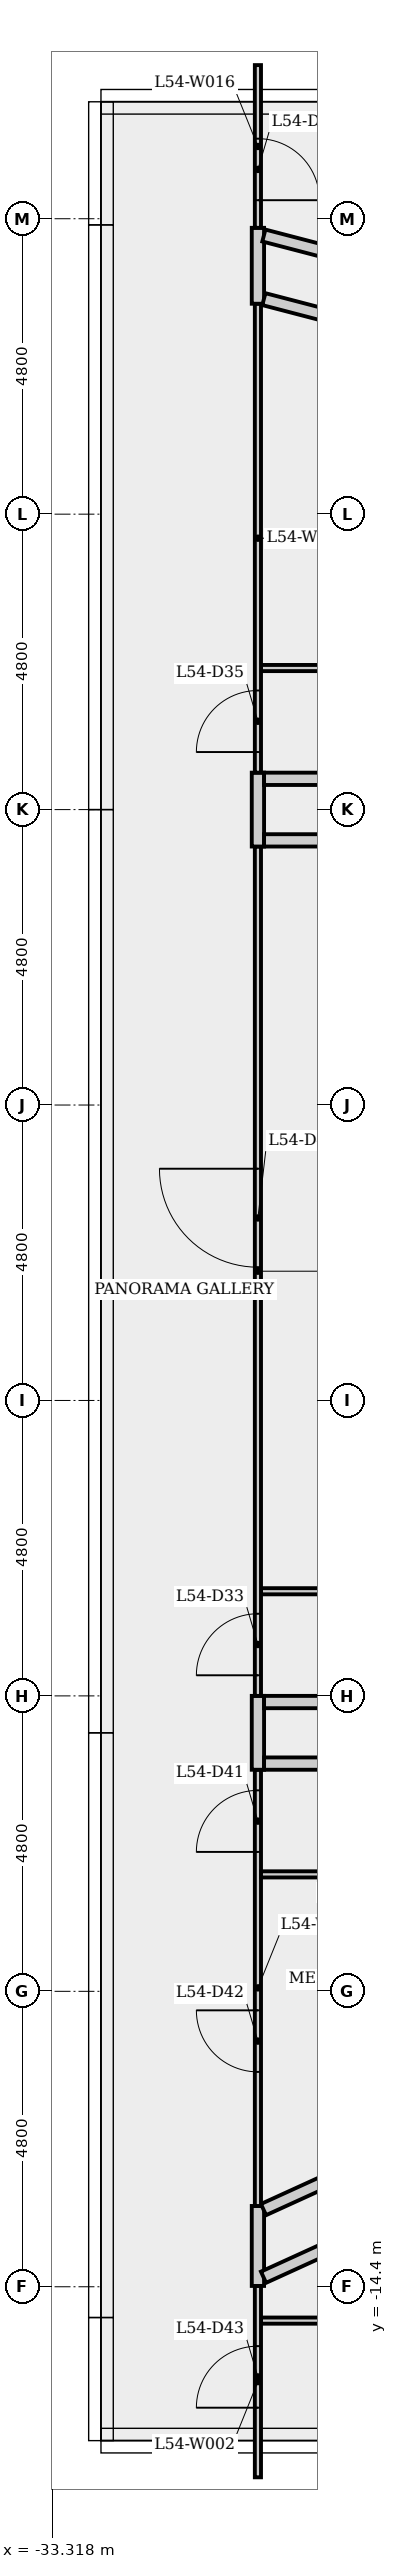
"""IFC4 building model, lengths in metres.
Left out: names, types, materials, properties, quantities, classifications, styles, units other than length and angle.
Written with IfcOpenShell. Run it as: python <this file> out.ifc"""

import sys

from ifc_helpers import new_model, si_unit, direction, frame, frame_2d, origin, place, context, subcontext, project, spatial, rectangle, extrude, element, fill, save


model = new_model("IFC4")
c1 = context("Model", 3, precision=1e-05, world=origin(), true_north=direction((0.0, 1.0)))
c2 = subcontext(c1, "Body", "Model", "MODEL_VIEW")
j1 = project(units=[si_unit("LENGTHUNIT", "METRE"), si_unit("PLANEANGLEUNIT", "RADIAN")], contexts=[c1])
p1 = place(None, origin())
s1 = spatial("IfcSite", under=j1, at=p1, CompositionType="ELEMENT")
p2 = place(p1, origin())
s2 = spatial("IfcBuilding", under=s1, at=p2, CompositionType="ELEMENT")
p3 = place(p2, frame((0.0, 0.0, 202.1)))
s3 = spatial("IfcBuildingStorey", under=s2, at=p3, CompositionType="ELEMENT", Elevation=202.1)
p4 = place(p3, frame((-29.924, -14.95, 0.0), z_axis=(0.0, 0.0, 1.0), x_axis=(1.0, 0.0, 0.0)))
e1 = element("IfcWall", 1, at=p4, inside=s3, PredefinedType="PARTITIONING", context=c2, shape_type="SweptSolid", body=[
    extrude(rectangle(XDim=13.496, YDim=0.1, at=frame_2d((6.748, 0.0))), origin(), (0.0, 0.0, 1.0), 3.6),
])
p5 = place(p4, frame((5.575, 0.0, 0.0)))
e2 = element("IfcOpeningElement", 2, at=p5, cuts=e1, PredefinedType="OPENING", context=c2, shape_type="SweptSolid", body=[
    extrude(rectangle(XDim=1.6, YDim=2.1, at=frame_2d((0.8, 1.05))), frame((0.0, 0.06, 0.0), z_axis=(0.0, -1.0, 0.0), x_axis=(1.0, 0.0, 0.0)), (0.0, 0.0, 1.0), 0.12),
])
p6 = place(p3, frame((-29.974, -17.496, 0.0), z_axis=(0.0, 0.0, 1.0), x_axis=(0.0, 1.0, 0.0)))
e3 = element("IfcWall", 3, at=p6, inside=s3, PredefinedType="PARTITIONING", context=c2, shape_type="SweptSolid", body=[
    extrude(rectangle(XDim=3.11, YDim=0.1, at=frame_2d((1.555, 0.0))), origin(), (0.0, 0.0, 1.0), 3.6),
])
p7 = place(p6, frame((1.131, 0.0, 0.0)))
e4 = element("IfcOpeningElement", 4, at=p7, cuts=e3, PredefinedType="OPENING", context=c2, shape_type="SweptSolid", body=[
    extrude(rectangle(XDim=1.0, YDim=2.1, at=frame_2d((0.5, 1.05))), frame((0.0, 0.06, 0.0), z_axis=(0.0, -1.0, 0.0), x_axis=(1.0, 0.0, 0.0)), (0.0, 0.0, 1.0), 0.12),
])
p8 = place(p3, frame((-29.974, -14.387, 0.0), z_axis=(0.0, 0.0, 1.0), x_axis=(0.0, 1.0, 0.0)))
e5 = element("IfcWall", 5, at=p8, inside=s3, PredefinedType="PLUMBINGWALL", context=c2, shape_type="SweptSolid", body=[
    extrude(rectangle(XDim=1.299, YDim=0.2, at=frame_2d((0.649, 0.0))), origin(), (0.0, 0.0, 1.0), 3.6),
])
p9 = place(p3, frame((-29.883, -13.146, 0.0), z_axis=(0.0, 0.0, 1.0), x_axis=(0.909854392912, 0.414927684903, 0.0)))
e6 = element("IfcWall", 6, at=p9, inside=s3, PredefinedType="PLUMBINGWALL", context=c2, shape_type="SweptSolid", body=[
    extrude(rectangle(XDim=16.791, YDim=0.2, at=frame_2d((8.396, 0.0))), origin(), (0.0, 0.0, 1.0), 3.6),
])
p10 = place(p3, frame((-29.974, -13.088, 0.0), z_axis=(0.0, 0.0, 1.0), x_axis=(0.0, 1.0, 0.0)))
e7 = element("IfcWall", 7, at=p10, inside=s3, PredefinedType="PARTITIONING", context=c2, shape_type="SweptSolid", body=[
    extrude(rectangle(XDim=7.088, YDim=0.1, at=frame_2d((3.544, 0.0))), origin(), (0.0, 0.0, 1.0), 3.6),
])
p11 = place(p10, frame((5.753, 0.0, 0.0)))
e8 = element("IfcOpeningElement", 8, at=p11, cuts=e7, PredefinedType="OPENING", context=c2, shape_type="SweptSolid", body=[
    extrude(rectangle(XDim=1.0, YDim=2.1, at=frame_2d((0.5, 1.05))), frame((0.0, 0.06, 0.0), z_axis=(0.0, -1.0, 0.0), x_axis=(1.0, 0.0, 0.0)), (0.0, 0.0, 1.0), 0.12),
])
p12 = place(p10, frame((2.179, 0.0, 0.0)))
e9 = element("IfcOpeningElement", 9, at=p12, cuts=e7, PredefinedType="OPENING", context=c2, shape_type="SweptSolid", body=[
    extrude(rectangle(XDim=1.0, YDim=2.1, at=frame_2d((0.5, 1.05))), frame((0.0, 0.06, 0.0), z_axis=(0.0, -1.0, 0.0), x_axis=(1.0, 0.0, 0.0)), (0.0, 0.0, 1.0), 0.12),
])
p13 = place(p3, frame((-29.974, -6.0, 0.0), z_axis=(0.0, 0.0, 1.0), x_axis=(0.0, 1.0, 0.0)))
e10 = element("IfcWall", 10, at=p13, inside=s3, PredefinedType="PLUMBINGWALL", context=c2, shape_type="SweptSolid", body=[
    extrude(rectangle(XDim=1.2, YDim=0.2, at=frame_2d((0.6, 0.0))), origin(), (0.0, 0.0, 1.0), 3.6),
])
p14 = place(p3, frame((-29.874, -4.9, 0.0), z_axis=(0.0, 0.0, 1.0), x_axis=(1.0, 0.0, 0.0)))
e11 = element("IfcWall", 11, at=p14, inside=s3, PredefinedType="PLUMBINGWALL", context=c2, shape_type="SweptSolid", body=[
    extrude(rectangle(XDim=18.173, YDim=0.2, at=frame_2d((9.086, 0.0))), origin(), (0.0, 0.0, 1.0), 3.6),
])
p15 = place(p3, frame((-29.924, -3.1, 0.0), z_axis=(0.0, 0.0, 1.0), x_axis=(1.0, 0.0, 0.0)))
e12 = element("IfcWall", 12, at=p15, inside=s3, PredefinedType="PARTITIONING", context=c2, shape_type="SweptSolid", body=[
    extrude(rectangle(XDim=18.173, YDim=0.1, at=frame_2d((9.086, 0.0))), origin(), (0.0, 0.0, 1.0), 3.6),
])
p16 = place(p15, frame((8.572, 0.0, 0.0)))
e13 = element("IfcOpeningElement", 13, at=p16, cuts=e12, PredefinedType="OPENING", context=c2, shape_type="SweptSolid", body=[
    extrude(rectangle(XDim=1.6, YDim=2.1, at=frame_2d((0.8, 1.05))), frame((0.0, 0.06, 0.0), z_axis=(0.0, -1.0, 0.0), x_axis=(1.0, 0.0, 0.0)), (0.0, 0.0, 1.0), 0.12),
])
p17 = place(p3, frame((-29.974, -4.8, 0.0), z_axis=(0.0, 0.0, 1.0), x_axis=(0.0, 1.0, 0.0)))
e14 = element("IfcWall", 14, at=p17, inside=s3, PredefinedType="PARTITIONING", context=c2, shape_type="SweptSolid", body=[
    extrude(rectangle(XDim=13.8, YDim=0.1, at=frame_2d((6.9, 0.0))), origin(), (0.0, 0.0, 1.0), 3.6),
])
p18 = place(p17, frame((0.335, 0.0, 0.0)))
e15 = element("IfcOpeningElement", 15, at=p18, cuts=e14, PredefinedType="OPENING", context=c2, shape_type="SweptSolid", body=[
    extrude(rectangle(XDim=1.0, YDim=2.1, at=frame_2d((0.5, 1.05))), frame((0.0, 0.06, 0.0), z_axis=(0.0, -1.0, 0.0), x_axis=(1.0, 0.0, 0.0)), (0.0, 0.0, 1.0), 0.12),
])
p19 = place(p17, frame((6.965, 0.0, 0.0)))
e16 = element("IfcOpeningElement", 16, at=p19, cuts=e14, PredefinedType="OPENING", context=c2, shape_type="SweptSolid", body=[
    extrude(rectangle(XDim=1.6, YDim=2.1, at=frame_2d((0.8, 1.05))), frame((0.0, 0.06, 0.0), z_axis=(0.0, -1.0, 0.0), x_axis=(1.0, 0.0, 0.0)), (0.0, 0.0, 1.0), 0.12),
])
p20 = place(p3, frame((-29.974, 9.0, 0.0), z_axis=(0.0, 0.0, 1.0), x_axis=(0.0, 1.0, 0.0)))
e17 = element("IfcWall", 17, at=p20, inside=s3, PredefinedType="PLUMBINGWALL", context=c2, shape_type="SweptSolid", body=[
    extrude(rectangle(XDim=1.2, YDim=0.2, at=frame_2d((0.6, 0.0))), origin(), (0.0, 0.0, 1.0), 3.6),
])
p21 = place(p3, frame((-29.874, 10.1, 0.0), z_axis=(0.0, 0.0, 1.0), x_axis=(1.0, 0.0, 0.0)))
e18 = element("IfcWall", 18, at=p21, inside=s3, PredefinedType="PLUMBINGWALL", context=c2, shape_type="SweptSolid", body=[
    extrude(rectangle(XDim=12.7, YDim=0.2, at=frame_2d((6.35, 0.0))), origin(), (0.0, 0.0, 1.0), 3.6),
])
p22 = place(p3, frame((-29.924, 11.9, 0.0), z_axis=(0.0, 0.0, 1.0), x_axis=(1.0, 0.0, 0.0)))
e19 = element("IfcWall", 19, at=p22, inside=s3, PredefinedType="PARTITIONING", context=c2, shape_type="SweptSolid", body=[
    extrude(rectangle(XDim=7.75, YDim=0.1, at=frame_2d((3.875, 0.0))), origin(), (0.0, 0.0, 1.0), 3.6),
])
p23 = place(p22, frame((3.075, 0.0, 0.0)))
e20 = element("IfcOpeningElement", 20, at=p23, cuts=e19, PredefinedType="OPENING", context=c2, shape_type="SweptSolid", body=[
    extrude(rectangle(XDim=1.6, YDim=2.1, at=frame_2d((0.8, 1.05))), frame((0.0, 0.06, 0.0), z_axis=(0.0, -1.0, 0.0), x_axis=(1.0, 0.0, 0.0)), (0.0, 0.0, 1.0), 0.12),
])
p24 = place(p3, frame((-29.974, 10.2, 0.0), z_axis=(0.0, 0.0, 1.0), x_axis=(0.0, 1.0, 0.0)))
e21 = element("IfcWall", 21, at=p24, inside=s3, PredefinedType="PARTITIONING", context=c2, shape_type="SweptSolid", body=[
    extrude(rectangle(XDim=7.619, YDim=0.1, at=frame_2d((3.81, 0.0))), origin(), (0.0, 0.0, 1.0), 3.6),
])
p25 = place(p24, frame((0.335, 0.0, 0.0)))
e22 = element("IfcOpeningElement", 22, at=p25, cuts=e21, PredefinedType="OPENING", context=c2, shape_type="SweptSolid", body=[
    extrude(rectangle(XDim=1.0, YDim=2.1, at=frame_2d((0.5, 1.05))), frame((0.0, 0.06, 0.0), z_axis=(0.0, -1.0, 0.0), x_axis=(1.0, 0.0, 0.0)), (0.0, 0.0, 1.0), 0.12),
])
p26 = place(p3, frame((-29.974, 17.819, 0.0), z_axis=(0.0, 0.0, 1.0), x_axis=(0.0, 1.0, 0.0)))
e23 = element("IfcWall", 23, at=p26, inside=s3, PredefinedType="PLUMBINGWALL", context=c2, shape_type="SweptSolid", body=[
    extrude(rectangle(XDim=1.233, YDim=0.2, at=frame_2d((0.617, 0.0))), origin(), (0.0, 0.0, 1.0), 3.6),
])
p27 = place(p3, frame((-29.877, 18.927, 0.0), z_axis=(0.0, 0.0, 1.0), x_axis=(0.967683445077, -0.252168098941, 0.0)))
e24 = element("IfcWall", 24, at=p27, inside=s3, PredefinedType="PLUMBINGWALL", context=c2, shape_type="SweptSolid", body=[
    extrude(rectangle(XDim=13.902, YDim=0.2, at=frame_2d((6.951, 0.0))), origin(), (0.0, 0.0, 1.0), 3.6),
])
p28 = place(p3, frame((-29.974, 21.696, 0.0), z_axis=(0.0, 0.0, 1.0), x_axis=(0.0, -1.0, 0.0)))
e25 = element("IfcWall", 25, at=p28, inside=s3, PredefinedType="PARTITIONING", context=c2, shape_type="SweptSolid", body=[
    extrude(rectangle(XDim=2.644, YDim=0.1, at=frame_2d((1.322, 0.0))), origin(), (0.0, 0.0, 1.0), 3.6),
])
p29 = place(p28, frame((1.195, 0.0, 0.0)))
e26 = element("IfcOpeningElement", 26, at=p29, cuts=e25, PredefinedType="OPENING", context=c2, shape_type="SweptSolid", body=[
    extrude(rectangle(XDim=1.0, YDim=2.1, at=frame_2d((0.5, 1.05))), frame((0.0, 0.06, 0.0), z_axis=(0.0, -1.0, 0.0), x_axis=(1.0, 0.0, 0.0)), (0.0, 0.0, 1.0), 0.12),
])
p30 = place(p3, frame((-26.747, -7.7, 0.0), z_axis=(0.0, 0.0, 1.0), x_axis=(-1.0, 0.0, 0.0)))
e27 = element("IfcWall", 27, at=p30, inside=s3, PredefinedType="PARTITIONING", context=c2, shape_type="SweptSolid", body=[
    extrude(rectangle(XDim=3.177, YDim=0.1, at=frame_2d((1.589, 0.0))), origin(), (0.0, 0.0, 1.0), 3.6),
])
p31 = place(p3, frame((-29.874, 9.1, 0.0), z_axis=(0.0, 0.0, 1.0), x_axis=(1.0, 0.0, 0.0)))
e28 = element("IfcWall", 28, at=p31, inside=s3, PredefinedType="PLUMBINGWALL", context=c2, shape_type="SweptSolid", body=[
    extrude(rectangle(XDim=15.801, YDim=0.2, at=frame_2d((7.9, 0.0))), origin(), (0.0, 0.0, 1.0), 3.6),
])
p32 = place(p3, frame((-22.174, 15.886, 0.0), z_axis=(0.0, 0.0, 1.0), x_axis=(-0.967676846945, 0.25219341761, 0.0)))
e29 = element("IfcWall", 29, at=p32, inside=s3, PredefinedType="PLUMBINGWALL", context=c2, shape_type="SweptSolid", body=[
    extrude(rectangle(XDim=7.96, YDim=0.2, at=frame_2d((3.98, 0.0))), origin(), (0.0, 0.0, 1.0), 3.6),
])
p33 = place(p3, frame((-17.174, -8.449, 0.0), z_axis=(0.0, 0.0, 1.0), x_axis=(-0.909851000848, -0.414935122947, 0.0)))
e30 = element("IfcWall", 30, at=p33, inside=s3, PredefinedType="PLUMBINGWALL", context=c2, shape_type="SweptSolid", body=[
    extrude(rectangle(XDim=13.968, YDim=0.2, at=frame_2d((6.984, 0.0))), origin(), (0.0, 0.0, 1.0), 3.6),
])
p34 = place(p3, frame((-14.782, -5.9, 0.0), z_axis=(0.0, 0.0, 1.0), x_axis=(-1.0, 0.0, 0.0)))
e31 = element("IfcWall", 31, at=p34, inside=s3, PredefinedType="PLUMBINGWALL", context=c2, shape_type="SweptSolid", body=[
    extrude(rectangle(XDim=15.092, YDim=0.2, at=frame_2d((7.546, 0.0))), origin(), (0.0, 0.0, 1.0), 3.6),
])
p35 = place(p18, origin())
e32 = element("IfcDoor", 32, at=p35, inside=s3, OperationType="SINGLE_SWING_LEFT", PredefinedType="DOOR", context=c2, shape_type="SweptSolid", body=[
    extrude(rectangle(XDim=1.0, YDim=2.1, at=frame_2d((0.5, 1.05))), frame((0.0, 0.025, 0.0), z_axis=(0.0, -1.0, 0.0), x_axis=(1.0, 0.0, 0.0)), (0.0, 0.0, 1.0), 0.05),
])
fill(e15, e32)
p36 = place(p29, origin())
e33 = element("IfcDoor", 33, at=p36, inside=s3, OperationType="SINGLE_SWING_RIGHT", PredefinedType="DOOR", context=c2, shape_type="SweptSolid", body=[
    extrude(rectangle(XDim=1.0, YDim=2.1, at=frame_2d((0.5, 1.05))), frame((0.0, 0.025, 0.0), z_axis=(0.0, -1.0, 0.0), x_axis=(1.0, 0.0, 0.0)), (0.0, 0.0, 1.0), 0.05),
])
fill(e26, e33)
p37 = place(p25, origin())
e34 = element("IfcDoor", 34, at=p37, inside=s3, OperationType="SINGLE_SWING_LEFT", PredefinedType="DOOR", context=c2, shape_type="SweptSolid", body=[
    extrude(rectangle(XDim=1.0, YDim=2.1, at=frame_2d((0.5, 1.05))), frame((0.0, 0.025, 0.0), z_axis=(0.0, -1.0, 0.0), x_axis=(1.0, 0.0, 0.0)), (0.0, 0.0, 1.0), 0.05),
])
fill(e22, e34)
p38 = place(p19, origin())
e35 = element("IfcDoor", 35, at=p38, inside=s3, OperationType="SINGLE_SWING_RIGHT", PredefinedType="DOOR", context=c2, shape_type="SweptSolid", body=[
    extrude(rectangle(XDim=1.6, YDim=2.1, at=frame_2d((0.8, 1.05))), frame((0.0, 0.025, 0.0), z_axis=(0.0, -1.0, 0.0), x_axis=(1.0, 0.0, 0.0)), (0.0, 0.0, 1.0), 0.05),
])
fill(e16, e35)
p39 = place(p11, origin())
e36 = element("IfcDoor", 36, at=p39, inside=s3, OperationType="SINGLE_SWING_LEFT", PredefinedType="DOOR", context=c2, shape_type="SweptSolid", body=[
    extrude(rectangle(XDim=1.0, YDim=2.1, at=frame_2d((0.5, 1.05))), frame((0.0, 0.025, 0.0), z_axis=(0.0, -1.0, 0.0), x_axis=(1.0, 0.0, 0.0)), (0.0, 0.0, 1.0), 0.05),
])
fill(e8, e36)
p40 = place(p12, origin())
e37 = element("IfcDoor", 37, at=p40, inside=s3, OperationType="SINGLE_SWING_RIGHT", PredefinedType="DOOR", context=c2, shape_type="SweptSolid", body=[
    extrude(rectangle(XDim=1.0, YDim=2.1, at=frame_2d((0.5, 1.05))), frame((0.0, 0.025, 0.0), z_axis=(0.0, -1.0, 0.0), x_axis=(1.0, 0.0, 0.0)), (0.0, 0.0, 1.0), 0.05),
])
fill(e9, e37)
p41 = place(p7, origin())
e38 = element("IfcDoor", 38, at=p41, inside=s3, OperationType="SINGLE_SWING_LEFT", PredefinedType="DOOR", context=c2, shape_type="SweptSolid", body=[
    extrude(rectangle(XDim=1.0, YDim=2.1, at=frame_2d((0.5, 1.05))), frame((0.0, 0.025, 0.0), z_axis=(0.0, -1.0, 0.0), x_axis=(1.0, 0.0, 0.0)), (0.0, 0.0, 1.0), 0.05),
])
fill(e4, e38)
save(model, sys.argv[1])
